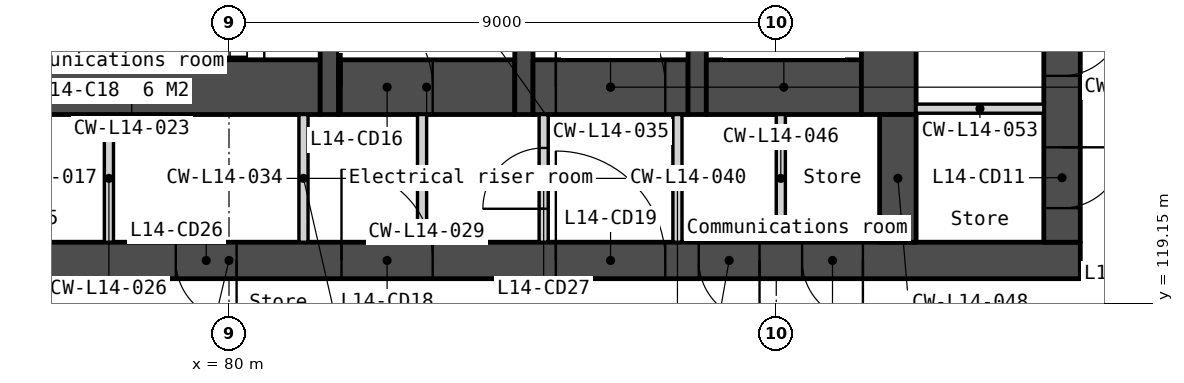
"""IFC4 building model, lengths in metres.
Left out: names, types, materials, properties, quantities, classifications, styles, units other than length and angle.
Written with IfcOpenShell. Run it as: python <this file> out.ifc"""

import sys

from ifc_helpers import new_model, si_unit, direction, frame, frame_2d, origin, place, context, subcontext, project, spatial, polyline, rectangle, outline, extrude, element, fill, save


model = new_model("IFC4")
c1 = context("Model", 3, precision=1e-05, world=origin(), true_north=direction((0.0, 1.0)))
c2 = subcontext(c1, "Body", "Model", "MODEL_VIEW")
j1 = project(units=[si_unit("LENGTHUNIT", "METRE"), si_unit("PLANEANGLEUNIT", "RADIAN")], contexts=[c1])
p1 = place(None, origin())
s1 = spatial("IfcSite", under=j1, at=p1, CompositionType="ELEMENT")
p2 = place(p1, origin())
s2 = spatial("IfcBuilding", under=s1, at=p2, CompositionType="ELEMENT")
p3 = place(p2, frame((0.0, 0.0, 63.0)))
s3 = spatial("IfcBuildingStorey", under=s2, at=p3, CompositionType="ELEMENT", Elevation=63.0)
p4 = place(p3, frame((66.0, 119.85, 0.0), z_axis=(0.0, 0.0, 1.0), x_axis=(1.0, 0.0, 0.0)))
e1 = element("IfcWall", 1, at=p4, inside=s3, PredefinedType="SOLIDWALL", context=c2, shape_type="SweptSolid", body=[
    extrude(rectangle(XDim=28.0, YDim=0.6, at=frame_2d((14.0, 0.0))), origin(), (0.0, 0.0, 1.0), 3.35),
])
p5 = place(p4, frame((6.825, 0.0, 0.0)))
e2 = element("IfcOpeningElement", 2, at=p5, cuts=e1, PredefinedType="OPENING", context=c2, shape_type="SweptSolid", body=[
    extrude(rectangle(XDim=1.8, YDim=2.1, at=frame_2d((0.9, 1.05))), frame((0.0, 0.31, 0.0), z_axis=(0.0, -1.0, 0.0), x_axis=(1.0, 0.0, 0.0)), (0.0, 0.0, 1.0), 0.62),
])
p6 = place(p4, frame((15.85, 0.0, 0.0)))
e3 = element("IfcOpeningElement", 3, at=p6, cuts=e1, PredefinedType="OPENING", context=c2, shape_type="SweptSolid", body=[
    extrude(rectangle(XDim=1.5, YDim=2.1, at=frame_2d((0.75, 1.05))), frame((0.0, 0.31, 0.0), z_axis=(0.0, -1.0, 0.0), x_axis=(1.0, 0.0, 0.0)), (0.0, 0.0, 1.0), 0.62),
])
p7 = place(p4, frame((19.375, 0.0, 0.0)))
e4 = element("IfcOpeningElement", 4, at=p7, cuts=e1, PredefinedType="OPENING", context=c2, shape_type="SweptSolid", body=[
    extrude(rectangle(XDim=1.8, YDim=2.1, at=frame_2d((0.9, 1.05))), frame((0.0, 0.31, 0.0), z_axis=(0.0, -1.0, 0.0), x_axis=(1.0, 0.0, 0.0)), (0.0, 0.0, 1.0), 0.62),
])
p8 = place(p4, frame((4.425, 0.0, 0.0)))
e5 = element("IfcOpeningElement", 5, at=p8, cuts=e1, PredefinedType="OPENING", context=c2, shape_type="SweptSolid", body=[
    extrude(rectangle(XDim=1.0, YDim=2.1, at=frame_2d((0.5, 1.05))), frame((0.0, 0.31, 0.0), z_axis=(0.0, -1.0, 0.0), x_axis=(1.0, 0.0, 0.0)), (0.0, 0.0, 1.0), 0.62),
])
p9 = place(p4, frame((9.925, 0.0, 0.0)))
e6 = element("IfcOpeningElement", 6, at=p9, cuts=e1, PredefinedType="OPENING", context=c2, shape_type="SweptSolid", body=[
    extrude(rectangle(XDim=1.0, YDim=2.1, at=frame_2d((0.5, 1.05))), frame((0.0, 0.31, 0.0), z_axis=(0.0, -1.0, 0.0), x_axis=(1.0, 0.0, 0.0)), (0.0, 0.0, 1.0), 0.62),
])
p10 = place(p4, frame((13.125, 0.0, 0.0)))
e7 = element("IfcOpeningElement", 7, at=p10, cuts=e1, PredefinedType="OPENING", context=c2, shape_type="SweptSolid", body=[
    extrude(rectangle(XDim=1.0, YDim=2.1, at=frame_2d((0.5, 1.05))), frame((0.0, 0.31, 0.0), z_axis=(0.0, -1.0, 0.0), x_axis=(1.0, 0.0, 0.0)), (0.0, 0.0, 1.0), 0.62),
])
p11 = place(p4, frame((21.725, 0.0, 0.0)))
e8 = element("IfcOpeningElement", 8, at=p11, cuts=e1, PredefinedType="OPENING", context=c2, shape_type="SweptSolid", body=[
    extrude(rectangle(XDim=1.0, YDim=2.1, at=frame_2d((0.5, 1.05))), frame((0.0, 0.31, 0.0), z_axis=(0.0, -1.0, 0.0), x_axis=(1.0, 0.0, 0.0)), (0.0, 0.0, 1.0), 0.62),
])
p12 = place(p4, frame((23.425, 0.0, 0.0)))
e9 = element("IfcOpeningElement", 9, at=p12, cuts=e1, PredefinedType="OPENING", context=c2, shape_type="SweptSolid", body=[
    extrude(rectangle(XDim=1.0, YDim=2.1, at=frame_2d((0.5, 1.05))), frame((0.0, 0.31, 0.0), z_axis=(0.0, -1.0, 0.0), x_axis=(1.0, 0.0, 0.0)), (0.0, 0.0, 1.0), 0.62),
])
p13 = place(p3, frame((75.3, 122.7, 0.0), z_axis=(0.0, 0.0, 1.0), x_axis=(1.0, 0.0, 0.0)))
e10 = element("IfcWall", 10, at=p13, inside=s3, PredefinedType="SOLIDWALL", context=c2, shape_type="SweptSolid", body=[
    extrude(rectangle(XDim=6.2, YDim=0.9, at=frame_2d((3.1, 0.0))), origin(), (0.0, 0.0, 1.0), 3.35),
])
for number, where, z_axis, x_axis in (
    (11, (78.025, 122.25, 0.0), (0.0, 0.0, 1.0), (0.0, -1.0, 0.0)),
    (12, (81.225, 122.25, 0.0), (0.0, 0.0, 1.0), (0.0, -1.0, 0.0)),
):
    element("IfcWall", number, at=place(p3, frame(where, z_axis=z_axis, x_axis=x_axis)), inside=s3, PredefinedType="PARTITIONING", context=c2, shape_type="SweptSolid", body=[
        extrude(rectangle(XDim=2.1, YDim=0.15, at=frame_2d((1.05, 0.0))), origin(), (0.0, 0.0, 1.0), 3.35),
    ])
p14 = place(p3, frame((81.65, 125.7, 0.0), z_axis=(0.0, 0.0, 1.0), x_axis=(0.0, -1.0, 0.0)))
e13 = element("IfcWall", 13, at=p14, inside=s3, PredefinedType="SOLIDWALL", context=c2, shape_type="SweptSolid", body=[
    extrude(rectangle(XDim=3.45, YDim=0.3, at=frame_2d((1.725, 0.0))), origin(), (0.0, 0.0, 1.0), 3.35),
])
p15 = place(p14, frame((0.75, 0.0, 0.0)))
e14 = element("IfcOpeningElement", 14, at=p15, cuts=e13, PredefinedType="OPENING", context=c2, shape_type="SweptSolid", body=[
    extrude(rectangle(XDim=1.0, YDim=2.1, at=frame_2d((0.5, 1.05))), frame((0.0, 0.16, 0.0), z_axis=(0.0, -1.0, 0.0), x_axis=(1.0, 0.0, 0.0)), (0.0, 0.0, 1.0), 0.32),
])
p16 = place(p3, frame((81.8, 122.7, 0.0), z_axis=(0.0, 0.0, 1.0), x_axis=(1.0, 0.0, 0.0)))
e15 = element("IfcWall", 15, at=p16, inside=s3, PredefinedType="SOLIDWALL", context=c2, shape_type="SweptSolid", body=[
    extrude(rectangle(XDim=2.9, YDim=0.9, at=frame_2d((1.45, 0.0))), origin(), (0.0, 0.0, 1.0), 3.35),
])
p17 = place(p16, frame((0.05, 0.0, 0.0)))
e16 = element("IfcOpeningElement", 16, at=p17, cuts=e15, PredefinedType="OPENING", context=c2, shape_type="SweptSolid", body=[
    extrude(rectangle(XDim=1.5, YDim=2.1, at=frame_2d((0.75, 1.05))), frame((0.0, 0.46, 0.0), z_axis=(0.0, -1.0, 0.0), x_axis=(1.0, 0.0, 0.0)), (0.0, 0.0, 1.0), 0.92),
])
p18 = place(p3, frame((83.175, 122.25, 0.0), z_axis=(0.0, 0.0, 1.0), x_axis=(0.0, -1.0, 0.0)))
e17 = element("IfcWall", 17, at=p18, inside=s3, PredefinedType="PARTITIONING", context=c2, shape_type="SweptSolid", body=[
    extrude(rectangle(XDim=2.1, YDim=0.15, at=frame_2d((1.05, 0.0))), origin(), (0.0, 0.0, 1.0), 3.35),
])
p19 = place(p3, frame((84.85, 133.95, 0.0), z_axis=(0.0, 0.0, 1.0), x_axis=(0.0, -1.0, 0.0)))
e18 = element("IfcWall", 18, at=p19, inside=s3, PredefinedType="SOLIDWALL", context=c2, shape_type="SweptSolid", body=[
    extrude(rectangle(XDim=11.7, YDim=0.3, at=frame_2d((5.85, 0.0))), origin(), (0.0, 0.0, 1.0), 3.35),
])
p20 = place(p3, frame((85.0, 122.7, 0.0), z_axis=(0.0, 0.0, 1.0), x_axis=(1.0, 0.0, 0.0)))
e19 = element("IfcWall", 19, at=p20, inside=s3, PredefinedType="SOLIDWALL", context=c2, shape_type="SweptSolid", body=[
    extrude(rectangle(XDim=2.55, YDim=0.9, at=frame_2d((1.275, 0.0))), origin(), (0.0, 0.0, 1.0), 3.35),
])
p21 = place(p20, frame((0.375, 0.0, 0.0)))
e20 = element("IfcOpeningElement", 20, at=p21, cuts=e19, PredefinedType="OPENING", context=c2, shape_type="SweptSolid", body=[
    extrude(rectangle(XDim=1.8, YDim=2.1, at=frame_2d((0.9, 1.05))), frame((0.0, 0.46, 0.0), z_axis=(0.0, -1.0, 0.0), x_axis=(1.0, 0.0, 0.0)), (0.0, 0.0, 1.0), 0.92),
])
p22 = place(p3, frame((85.175, 122.25, 0.0), z_axis=(0.0, 0.0, 1.0), x_axis=(0.0, -1.0, 0.0)))
e21 = element("IfcWall", 21, at=p22, inside=s3, PredefinedType="PARTITIONING", context=c2, shape_type="SweptSolid", body=[
    extrude(rectangle(XDim=2.1, YDim=0.15, at=frame_2d((1.05, 0.0))), origin(), (0.0, 0.0, 1.0), 3.35),
])
p23 = place(p22, frame((0.55, 0.0, 0.0)))
e22 = element("IfcOpeningElement", 22, at=p23, cuts=e21, PredefinedType="OPENING", context=c2, shape_type="SweptSolid", body=[
    extrude(rectangle(XDim=1.0, YDim=2.1, at=frame_2d((0.5, 1.05))), frame((0.0, 0.085, 0.0), z_axis=(0.0, -1.0, 0.0), x_axis=(1.0, 0.0, 0.0)), (0.0, 0.0, 1.0), 0.17),
])
p24 = place(p3, frame((87.375, 122.25, 0.0), z_axis=(0.0, 0.0, 1.0), x_axis=(0.0, -1.0, 0.0)))
e23 = element("IfcWall", 23, at=p24, inside=s3, PredefinedType="PARTITIONING", context=c2, shape_type="SweptSolid", body=[
    extrude(rectangle(XDim=2.1, YDim=0.15, at=frame_2d((1.05, 0.0))), origin(), (0.0, 0.0, 1.0), 3.35),
])
p25 = place(p3, frame((87.7, 133.95, 0.0), z_axis=(0.0, 0.0, 1.0), x_axis=(0.0, -1.0, 0.0)))
e24 = element("IfcWall", 24, at=p25, inside=s3, PredefinedType="SOLIDWALL", context=c2, shape_type="SweptSolid", body=[
    extrude(rectangle(XDim=11.7, YDim=0.3, at=frame_2d((5.85, 0.0))), origin(), (0.0, 0.0, 1.0), 3.35),
])
p26 = place(p25, frame((6.95, 0.0, 0.0)))
e25 = element("IfcOpeningElement", 25, at=p26, cuts=e24, PredefinedType="OPENING", context=c2, shape_type="SweptSolid", body=[
    extrude(rectangle(XDim=1.1, YDim=2.1, at=frame_2d((0.55, 1.05))), frame((0.0, 0.16, 0.0), z_axis=(0.0, -1.0, 0.0), x_axis=(1.0, 0.0, 0.0)), (0.0, 0.0, 1.0), 0.32),
])
p27 = place(p25, frame((5.1, 0.0, 0.0)))
e26 = element("IfcOpeningElement", 26, at=p27, cuts=e24, PredefinedType="OPENING", context=c2, shape_type="SweptSolid", body=[
    extrude(rectangle(XDim=1.0, YDim=2.1, at=frame_2d((0.5, 1.05))), frame((0.0, 0.16, 0.0), z_axis=(0.0, -1.0, 0.0), x_axis=(1.0, 0.0, 0.0)), (0.0, 0.0, 1.0), 0.32),
])
p28 = place(p25, frame((9.25, 0.0, 0.0)))
e27 = element("IfcOpeningElement", 27, at=p28, cuts=e24, PredefinedType="OPENING", context=c2, shape_type="SweptSolid", body=[
    extrude(rectangle(XDim=1.1, YDim=2.1, at=frame_2d((0.55, 1.05))), frame((0.0, 0.16, 0.0), z_axis=(0.0, -1.0, 0.0), x_axis=(1.0, 0.0, 0.0)), (0.0, 0.0, 1.0), 0.32),
])
p29 = place(p3, frame((87.85, 122.7, 0.0), z_axis=(0.0, 0.0, 1.0), x_axis=(1.0, 0.0, 0.0)))
e28 = element("IfcWall", 28, at=p29, inside=s3, PredefinedType="SOLIDWALL", context=c2, shape_type="SweptSolid", body=[
    extrude(rectangle(XDim=2.55, YDim=0.9, at=frame_2d((1.275, 0.0))), origin(), (0.0, 0.0, 1.0), 3.35),
])
p30 = place(p3, frame((89.075, 122.25, 0.0), z_axis=(0.0, 0.0, 1.0), x_axis=(0.0, -1.0, 0.0)))
e29 = element("IfcWall", 29, at=p30, inside=s3, PredefinedType="PARTITIONING", context=c2, shape_type="SweptSolid", body=[
    extrude(rectangle(XDim=2.1, YDim=0.15, at=frame_2d((1.05, 0.0))), origin(), (0.0, 0.0, 1.0), 3.35),
])
p31 = place(p3, frame((90.85, 133.95, 0.0), z_axis=(0.0, 0.0, 1.0), x_axis=(0.0, -1.0, 0.0)))
e30 = element("IfcWall", 30, at=p31, inside=s3, PredefinedType="SOLIDWALL", context=c2, shape_type="SweptSolid", body=[
    extrude(rectangle(XDim=11.7, YDim=0.9, at=frame_2d((5.85, 0.0))), origin(), (0.0, 0.0, 1.0), 3.35),
])
p32 = place(p3, frame((91.0, 122.25, 0.0), z_axis=(0.0, 0.0, 1.0), x_axis=(0.0, -1.0, 0.0)))
e31 = element("IfcWall", 31, at=p32, inside=s3, PredefinedType="SOLIDWALL", context=c2, shape_type="SweptSolid", body=[
    extrude(rectangle(XDim=2.1, YDim=0.6, at=frame_2d((1.05, 0.0))), origin(), (0.0, 0.0, 1.0), 3.35),
])
p33 = place(p3, frame((91.3, 122.346, 0.0), z_axis=(0.0, 0.0, 1.0), x_axis=(1.0, 0.0, 0.0)))
e32 = element("IfcWall", 32, at=p33, inside=s3, PredefinedType="PARTITIONING", context=c2, shape_type="SweptSolid", body=[
    extrude(rectangle(XDim=2.1, YDim=0.15, at=frame_2d((1.05, 0.0))), origin(), (0.0, 0.0, 1.0), 3.35),
])
p34 = place(p3, frame((93.7, 133.95, 0.0), z_axis=(0.0, 0.0, 1.0), x_axis=(0.0, -1.0, 0.0)))
e33 = element("IfcWall", 33, at=p34, inside=s3, PredefinedType="SOLIDWALL", context=c2, shape_type="SweptSolid", body=[
    extrude(rectangle(XDim=13.8, YDim=0.6, at=frame_2d((6.9, 0.0))), origin(), (0.0, 0.0, 1.0), 3.35),
])
p35 = place(p34, frame((0.6, 0.0, 0.0)))
e34 = element("IfcOpeningElement", 34, at=p35, cuts=e33, PredefinedType="OPENING", context=c2, shape_type="SweptSolid", body=[
    extrude(rectangle(XDim=1.1, YDim=2.1, at=frame_2d((0.55, 1.05))), frame((0.0, 0.31, 0.0), z_axis=(0.0, -1.0, 0.0), x_axis=(1.0, 0.0, 0.0)), (0.0, 0.0, 1.0), 0.62),
])
p36 = place(p34, frame((10.064, 0.0, 0.0)))
e35 = element("IfcOpeningElement", 35, at=p36, cuts=e33, PredefinedType="OPENING", context=c2, shape_type="SweptSolid", body=[
    extrude(rectangle(XDim=1.0, YDim=2.1, at=frame_2d((0.5, 1.05))), frame((0.0, 0.31, 0.0), z_axis=(0.0, -1.0, 0.0), x_axis=(1.0, 0.0, 0.0)), (0.0, 0.0, 1.0), 0.62),
])
p37 = place(p34, frame((8.35, 0.0, 0.0)))
e36 = element("IfcOpeningElement", 36, at=p37, cuts=e33, PredefinedType="OPENING", context=c2, shape_type="SweptSolid", body=[
    extrude(rectangle(XDim=0.85, YDim=2.1, at=frame_2d((0.425, 1.05))), frame((0.0, 0.31, 0.0), z_axis=(0.0, -1.0, 0.0), x_axis=(1.0, 0.0, 0.0)), (0.0, 0.0, 1.0), 0.62),
])
p38 = place(p34, frame((12.239, 0.0, 0.0)))
e37 = element("IfcOpeningElement", 37, at=p38, cuts=e33, PredefinedType="OPENING", context=c2, shape_type="SweptSolid", body=[
    extrude(rectangle(XDim=1.0, YDim=2.1, at=frame_2d((0.5, 1.05))), frame((0.0, 0.31, 0.0), z_axis=(0.0, -1.0, 0.0), x_axis=(1.0, 0.0, 0.0)), (0.0, 0.0, 1.0), 0.62),
])
p39 = place(p3, frame((83.105, 90.599, -0.15), z_axis=(0.0, 0.0, 1.0), x_axis=(0.499999201451, 0.866025864826, 0.0)))
e38 = element("IfcWall", 38, at=p39, inside=s3, PredefinedType="SOLIDWALL", context=c2, shape_type="SweptSolid", body=[
    extrude(outline(polyline([(44.8, 0.0), (44.8, 3.5), (0.0, 3.5), (0.0, 0.0), (44.8, 0.0)])), frame((0.0, 0.225, 0.0), z_axis=(0.0, -1.0, 0.0), x_axis=(1.0, 0.0, 0.0)), (0.0, 0.0, 1.0), 0.45),
])
p40 = place(p39, frame((2.43, 0.0, 1.05)))
e39 = element("IfcOpeningElement", 39, at=p40, cuts=e38, PredefinedType="OPENING", context=c2, shape_type="SweptSolid", body=[
    extrude(rectangle(XDim=1.8, YDim=1.5, at=frame_2d((0.9, 0.75))), frame((0.0, 0.235, 0.0), z_axis=(0.0, -1.0, 0.0), x_axis=(1.0, 0.0, 0.0)), (0.0, 0.0, 1.0), 0.47),
])
p41 = place(p39, frame((4.73, 0.0, 1.05)))
e40 = element("IfcOpeningElement", 40, at=p41, cuts=e38, PredefinedType="OPENING", context=c2, shape_type="SweptSolid", body=[
    extrude(rectangle(XDim=1.8, YDim=1.5, at=frame_2d((0.9, 0.75))), frame((0.0, 0.235, 0.0), z_axis=(0.0, -1.0, 0.0), x_axis=(1.0, 0.0, 0.0)), (0.0, 0.0, 1.0), 0.47),
])
p42 = place(p39, frame((11.39, 0.0, 1.05)))
e41 = element("IfcOpeningElement", 41, at=p42, cuts=e38, PredefinedType="OPENING", context=c2, shape_type="SweptSolid", body=[
    extrude(rectangle(XDim=1.8, YDim=1.5, at=frame_2d((0.9, 0.75))), frame((0.0, 0.235, 0.0), z_axis=(0.0, -1.0, 0.0), x_axis=(1.0, 0.0, 0.0)), (0.0, 0.0, 1.0), 0.47),
])
p43 = place(p39, frame((13.69, 0.0, 1.05)))
e42 = element("IfcOpeningElement", 42, at=p43, cuts=e38, PredefinedType="OPENING", context=c2, shape_type="SweptSolid", body=[
    extrude(rectangle(XDim=1.8, YDim=1.5, at=frame_2d((0.9, 0.75))), frame((0.0, 0.235, 0.0), z_axis=(0.0, -1.0, 0.0), x_axis=(1.0, 0.0, 0.0)), (0.0, 0.0, 1.0), 0.47),
])
p44 = place(p39, frame((20.35, 0.0, 1.05)))
e43 = element("IfcOpeningElement", 43, at=p44, cuts=e38, PredefinedType="OPENING", context=c2, shape_type="SweptSolid", body=[
    extrude(rectangle(XDim=1.8, YDim=1.5, at=frame_2d((0.9, 0.75))), frame((0.0, 0.235, 0.0), z_axis=(0.0, -1.0, 0.0), x_axis=(1.0, 0.0, 0.0)), (0.0, 0.0, 1.0), 0.47),
])
p45 = place(p39, frame((22.65, 0.0, 1.05)))
e44 = element("IfcOpeningElement", 44, at=p45, cuts=e38, PredefinedType="OPENING", context=c2, shape_type="SweptSolid", body=[
    extrude(rectangle(XDim=1.8, YDim=1.5, at=frame_2d((0.9, 0.75))), frame((0.0, 0.235, 0.0), z_axis=(0.0, -1.0, 0.0), x_axis=(1.0, 0.0, 0.0)), (0.0, 0.0, 1.0), 0.47),
])
p46 = place(p39, frame((29.31, 0.0, 1.05)))
e45 = element("IfcOpeningElement", 45, at=p46, cuts=e38, PredefinedType="OPENING", context=c2, shape_type="SweptSolid", body=[
    extrude(rectangle(XDim=1.8, YDim=1.5, at=frame_2d((0.9, 0.75))), frame((0.0, 0.235, 0.0), z_axis=(0.0, -1.0, 0.0), x_axis=(1.0, 0.0, 0.0)), (0.0, 0.0, 1.0), 0.47),
])
p47 = place(p39, frame((31.61, 0.0, 1.05)))
e46 = element("IfcOpeningElement", 46, at=p47, cuts=e38, PredefinedType="OPENING", context=c2, shape_type="SweptSolid", body=[
    extrude(rectangle(XDim=1.8, YDim=1.5, at=frame_2d((0.9, 0.75))), frame((0.0, 0.235, 0.0), z_axis=(0.0, -1.0, 0.0), x_axis=(1.0, 0.0, 0.0)), (0.0, 0.0, 1.0), 0.47),
])
p48 = place(p39, frame((38.27, 0.0, 1.05)))
e47 = element("IfcOpeningElement", 47, at=p48, cuts=e38, PredefinedType="OPENING", context=c2, shape_type="SweptSolid", body=[
    extrude(rectangle(XDim=1.8, YDim=1.5, at=frame_2d((0.9, 0.75))), frame((0.0, 0.235, 0.0), z_axis=(0.0, -1.0, 0.0), x_axis=(1.0, 0.0, 0.0)), (0.0, 0.0, 1.0), 0.47),
])
p49 = place(p39, frame((40.57, 0.0, 1.05)))
e48 = element("IfcOpeningElement", 48, at=p49, cuts=e38, PredefinedType="OPENING", context=c2, shape_type="SweptSolid", body=[
    extrude(rectangle(XDim=1.8, YDim=1.5, at=frame_2d((0.9, 0.75))), frame((0.0, 0.235, 0.0), z_axis=(0.0, -1.0, 0.0), x_axis=(1.0, 0.0, 0.0)), (0.0, 0.0, 1.0), 0.47),
])
p50 = place(p36, origin())
e49 = element("IfcDoor", 49, at=p50, inside=s3, OperationType="SINGLE_SWING_LEFT", PredefinedType="DOOR", context=c2, shape_type="SweptSolid", body=[
    extrude(rectangle(XDim=1.0, YDim=2.1, at=frame_2d((0.5, 1.05))), frame((0.0, 0.025, 0.0), z_axis=(0.0, -1.0, 0.0), x_axis=(1.0, 0.0, 0.0)), (0.0, 0.0, 1.0), 0.05),
])
fill(e35, e49)
p51 = place(p38, origin())
e50 = element("IfcDoor", 50, at=p51, inside=s3, OperationType="SINGLE_SWING_LEFT", PredefinedType="DOOR", context=c2, shape_type="SweptSolid", body=[
    extrude(rectangle(XDim=1.0, YDim=2.1, at=frame_2d((0.5, 1.05))), frame((0.0, 0.025, 0.0), z_axis=(0.0, -1.0, 0.0), x_axis=(1.0, 0.0, 0.0)), (0.0, 0.0, 1.0), 0.05),
])
fill(e37, e50)
p52 = place(p21, origin())
e51 = element("IfcDoor", 51, at=p52, inside=s3, OperationType="DOUBLE_DOOR_DOUBLE_SWING", PredefinedType="DOOR", context=c2, shape_type="SweptSolid", body=[
    extrude(rectangle(XDim=1.8, YDim=2.1, at=frame_2d((0.9, 1.05))), frame((0.0, 0.025, 0.0), z_axis=(0.0, -1.0, 0.0), x_axis=(1.0, 0.0, 0.0)), (0.0, 0.0, 1.0), 0.05),
])
fill(e20, e51)
p53 = place(p17, origin())
e52 = element("IfcDoor", 52, at=p53, inside=s3, OperationType="DOUBLE_DOOR_DOUBLE_SWING", PredefinedType="DOOR", context=c2, shape_type="SweptSolid", body=[
    extrude(rectangle(XDim=1.5, YDim=2.1, at=frame_2d((0.75, 1.05))), frame((0.0, 0.025, 0.0), z_axis=(0.0, -1.0, 0.0), x_axis=(1.0, 0.0, 0.0)), (0.0, 0.0, 1.0), 0.05),
])
fill(e16, e52)
p54 = place(p6, origin())
e53 = element("IfcDoor", 53, at=p54, inside=s3, OperationType="DOUBLE_DOOR_DOUBLE_SWING", PredefinedType="DOOR", context=c2, shape_type="SweptSolid", body=[
    extrude(rectangle(XDim=1.5, YDim=2.1, at=frame_2d((0.75, 1.05))), frame((0.0, 0.025, 0.0), z_axis=(0.0, -1.0, 0.0), x_axis=(1.0, 0.0, 0.0)), (0.0, 0.0, 1.0), 0.05),
])
fill(e3, e53)
p55 = place(p7, origin())
e54 = element("IfcDoor", 54, at=p55, inside=s3, OperationType="DOUBLE_DOOR_DOUBLE_SWING", PredefinedType="DOOR", context=c2, shape_type="SweptSolid", body=[
    extrude(rectangle(XDim=1.8, YDim=2.1, at=frame_2d((0.9, 1.05))), frame((0.0, 0.025, 0.0), z_axis=(0.0, -1.0, 0.0), x_axis=(1.0, 0.0, 0.0)), (0.0, 0.0, 1.0), 0.05),
])
fill(e4, e54)
p56 = place(p10, origin())
e55 = element("IfcDoor", 55, at=p56, inside=s3, OperationType="SINGLE_SWING_RIGHT", PredefinedType="DOOR", context=c2, shape_type="SweptSolid", body=[
    extrude(rectangle(XDim=1.0, YDim=2.1, at=frame_2d((0.5, 1.05))), frame((0.0, 0.025, 0.0), z_axis=(0.0, -1.0, 0.0), x_axis=(1.0, 0.0, 0.0)), (0.0, 0.0, 1.0), 0.05),
])
fill(e7, e55)
p57 = place(p23, origin())
e56 = element("IfcDoor", 56, at=p57, inside=s3, OperationType="SINGLE_SWING_RIGHT", PredefinedType="DOOR", context=c2, shape_type="SweptSolid", body=[
    extrude(rectangle(XDim=1.0, YDim=2.1, at=frame_2d((0.5, 1.05))), frame((0.0, 0.025, 0.0), z_axis=(0.0, -1.0, 0.0), x_axis=(1.0, 0.0, 0.0)), (0.0, 0.0, 1.0), 0.05),
])
fill(e22, e56)
p58 = place(p11, origin())
e57 = element("IfcDoor", 57, at=p58, inside=s3, OperationType="SINGLE_SWING_RIGHT", PredefinedType="DOOR", context=c2, shape_type="SweptSolid", body=[
    extrude(rectangle(XDim=1.0, YDim=2.1, at=frame_2d((0.5, 1.05))), frame((0.0, 0.025, 0.0), z_axis=(0.0, -1.0, 0.0), x_axis=(1.0, 0.0, 0.0)), (0.0, 0.0, 1.0), 0.05),
])
fill(e8, e57)
p59 = place(p12, origin())
e58 = element("IfcDoor", 58, at=p59, inside=s3, OperationType="SINGLE_SWING_RIGHT", PredefinedType="DOOR", context=c2, shape_type="SweptSolid", body=[
    extrude(rectangle(XDim=1.0, YDim=2.1, at=frame_2d((0.5, 1.05))), frame((0.0, 0.025, 0.0), z_axis=(0.0, -1.0, 0.0), x_axis=(1.0, 0.0, 0.0)), (0.0, 0.0, 1.0), 0.05),
])
fill(e9, e58)
save(model, sys.argv[1])
